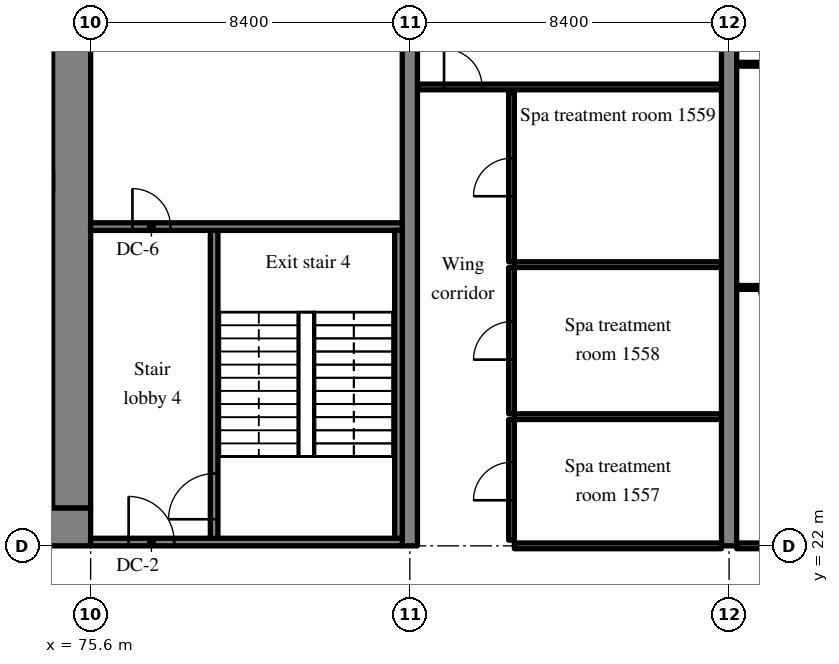
"""IFC4 building model, lengths in metres.
Left out: names, types, materials, properties, quantities, classifications, styles, units other than length and angle.
Written with IfcOpenShell. Run it as: python <this file> out.ifc"""

import sys

from ifc_helpers import new_model, si_unit, direction, frame, frame_2d, origin, place, context, subcontext, project, spatial, rectangle, extrude, source, transform, mapped, element, fill, save


model = new_model("IFC4")
c1 = context("Model", 3, precision=1e-05, world=origin(), true_north=direction((0.0, 1.0)))
c2 = subcontext(c1, "Body", "Model", "MODEL_VIEW")
j1 = project(units=[si_unit("LENGTHUNIT", "METRE"), si_unit("PLANEANGLEUNIT", "RADIAN")], contexts=[c1])
p1 = place(None, origin())
s1 = spatial("IfcSite", under=j1, at=p1, CompositionType="ELEMENT")
p2 = place(p1, origin())
s2 = spatial("IfcBuilding", under=s1, at=p2, CompositionType="ELEMENT")
p3 = place(p2, frame((0.0, 0.0, 65.8)))
s3 = spatial("IfcBuildingStorey", under=s2, at=p3, CompositionType="ELEMENT", Elevation=65.8)
m1 = source(origin(), c2, "Body", "SweptSolid", [
    extrude(rectangle(XDim=50.4, YDim=1.0, at=frame_2d((25.2, 0.0))), origin(), (0.0, 0.0, 1.0), 3.52),
])
p4 = place(p3, frame((25.2, 22.5, 0.0), z_axis=(0.0, 0.0, 1.0), x_axis=(1.0, 0.0, 0.0)))
e1 = element("IfcWall", 1, at=p4, inside=s3, PredefinedType="SHEAR", context=c2, shape_type="MappedRepresentation", body=[
    mapped(m1, transform((0.0, 0.0, 0.0), scale=1.0)),
])
m2 = source(origin(), c2, "Body", "SweptSolid", [
    extrude(rectangle(XDim=1.8, YDim=2.1, at=frame_2d((0.9, 1.05))), frame((0.0, 0.51, 0.0), z_axis=(0.0, -1.0, 0.0), x_axis=(1.0, 0.0, 0.0)), (0.0, 0.0, 1.0), 1.02),
])
p5 = place(p4, frame((15.9, 0.0, 0.0)))
e2 = element("IfcOpeningElement", 2, at=p5, cuts=e1, PredefinedType="OPENING", context=c2, shape_type="MappedRepresentation", body=[
    mapped(m2, transform((0.0, 0.0, 0.0), scale=1.0)),
])
m3 = source(origin(), c2, "Body", "SweptSolid", [
    extrude(rectangle(XDim=1.2, YDim=2.1, at=frame_2d((0.6, 1.05))), frame((0.0, 0.51, 0.0), z_axis=(0.0, -1.0, 0.0), x_axis=(1.0, 0.0, 0.0)), (0.0, 0.0, 1.0), 1.02),
])
p6 = place(p4, frame((26.987, 0.0, 0.0)))
e3 = element("IfcOpeningElement", 3, at=p6, cuts=e1, PredefinedType="OPENING", context=c2, shape_type="MappedRepresentation", body=[
    mapped(m3, transform((0.0, 0.0, 0.0), scale=1.0)),
])
m4 = source(origin(), c2, "Body", "SweptSolid", [
    extrude(rectangle(XDim=0.9, YDim=2.1, at=frame_2d((0.45, 1.05))), frame((0.0, 0.51, 0.0), z_axis=(0.0, -1.0, 0.0), x_axis=(1.0, 0.0, 0.0)), (0.0, 0.0, 1.0), 1.02),
])
p7 = place(p4, frame((34.5, 0.0, 0.0)))
e4 = element("IfcOpeningElement", 4, at=p7, cuts=e1, PredefinedType="OPENING", context=c2, shape_type="MappedRepresentation", body=[
    mapped(m4, transform((0.0, 0.0, 0.0), scale=1.0)),
])
p8 = place(p4, frame((31.5, 0.0, 0.0)))
e5 = element("IfcOpeningElement", 5, at=p8, cuts=e1, PredefinedType="OPENING", context=c2, shape_type="MappedRepresentation", body=[
    mapped(m4, transform((0.0, 0.0, 0.0), scale=1.0)),
])
p9 = place(p4, frame((39.769, 0.0, 0.0)))
e6 = element("IfcOpeningElement", 6, at=p9, cuts=e1, PredefinedType="OPENING", context=c2, shape_type="MappedRepresentation", body=[
    mapped(m4, transform((0.0, 0.0, 0.0), scale=1.0)),
])
p10 = place(p4, frame((36.756, 0.0, 0.0)))
e7 = element("IfcOpeningElement", 7, at=p10, cuts=e1, PredefinedType="OPENING", context=c2, shape_type="MappedRepresentation", body=[
    mapped(m4, transform((0.0, 0.0, 0.0), scale=1.0)),
])
p11 = place(p4, frame((6.438, 0.0, 0.0)))
e8 = element("IfcOpeningElement", 8, at=p11, cuts=e1, PredefinedType="OPENING", context=c2, shape_type="MappedRepresentation", body=[
    mapped(m3, transform((0.0, 0.0, 0.0), scale=1.0)),
])
p12 = place(p4, frame((47.725, 0.0, 0.0)))
e9 = element("IfcOpeningElement", 9, at=p12, cuts=e1, PredefinedType="OPENING", context=c2, shape_type="MappedRepresentation", body=[
    mapped(m3, transform((0.0, 0.0, 0.0), scale=1.0)),
])
m5 = source(origin(), c2, "Body", "SweptSolid", [
    extrude(rectangle(XDim=18.0, YDim=1.0, at=frame_2d((9.0, 0.0))), origin(), (0.0, 0.0, 1.0), 3.52),
])
p13 = place(p3, frame((75.1, 23.0, 0.0), z_axis=(0.0, 0.0, 1.0), x_axis=(0.0, 1.0, 0.0)))
e10 = element("IfcWall", 10, at=p13, inside=s3, PredefinedType="SHEAR", context=c2, shape_type="MappedRepresentation", body=[
    mapped(m5, transform((0.0, 0.0, 0.0), scale=1.0)),
])
p14 = place(p13, frame((12.4, 0.0, 0.0)))
e11 = element("IfcOpeningElement", 11, at=p14, cuts=e10, PredefinedType="OPENING", context=c2, shape_type="MappedRepresentation", body=[
    mapped(m3, transform((0.0, 0.0, 0.0), scale=1.0)),
])
m6 = source(origin(), c2, "Body", "SweptSolid", [
    extrude(rectangle(XDim=20.0, YDim=0.4, at=frame_2d((10.0, 0.0))), origin(), (0.0, 0.0, 1.0), 3.52),
])
for number, where, z_axis, x_axis in (
    (12, (84.0, 22.0, 0.0), (0.0, 0.0, 1.0), (0.0, 1.0, 0.0)),
    (13, (92.4, 22.0, 0.0), (0.0, 0.0, 1.0), (0.0, 1.0, 0.0)),
):
    element("IfcWall", number, at=place(p3, frame(where, z_axis=z_axis, x_axis=x_axis)), inside=s3, PredefinedType="SHEAR", context=c2, shape_type="MappedRepresentation", body=[
        mapped(m6, transform((0.0, 0.0, 0.0), scale=1.0)),
    ])
m7 = source(origin(), c2, "Body", "SweptSolid", [
    extrude(rectangle(XDim=2.15, YDim=0.2, at=frame_2d((1.075, 0.0))), origin(), (0.0, 0.0, 1.0), 3.52),
])
p15 = place(p3, frame((72.45, 33.6, 0.0), z_axis=(0.0, 0.0, 1.0), x_axis=(1.0, 0.0, 0.0)))
e14 = element("IfcWall", 14, at=p15, inside=s3, PredefinedType="SOLIDWALL", context=c2, shape_type="MappedRepresentation", body=[
    mapped(m7, transform((0.0, 0.0, 0.0), scale=1.0)),
])
m8 = source(origin(), c2, "Body", "SweptSolid", [
    extrude(rectangle(XDim=8.3, YDim=0.2, at=frame_2d((4.15, 0.0))), origin(), (0.0, 0.0, 1.0), 3.52),
])
p16 = place(p3, frame((78.85, 22.1, 0.0), z_axis=(0.0, 0.0, 1.0), x_axis=(0.0, 1.0, 0.0)))
e15 = element("IfcWall", 15, at=p16, inside=s3, PredefinedType="SOLIDWALL", context=c2, shape_type="MappedRepresentation", body=[
    mapped(m8, transform((0.0, 0.0, 0.0), scale=1.0)),
])
m9 = source(origin(), c2, "Body", "SweptSolid", [
    extrude(rectangle(XDim=1.2, YDim=2.1, at=frame_2d((0.6, 1.05))), frame((0.0, 0.11, 0.0), z_axis=(0.0, -1.0, 0.0), x_axis=(1.0, 0.0, 0.0)), (0.0, 0.0, 1.0), 0.22),
])
p17 = place(p16, frame((0.6, 0.0, 0.0)))
e16 = element("IfcOpeningElement", 16, at=p17, cuts=e15, PredefinedType="OPENING", context=c2, shape_type="MappedRepresentation", body=[
    mapped(m9, transform((0.0, 0.0, 0.0), scale=1.0)),
])
m10 = source(origin(), c2, "Body", "SweptSolid", [
    extrude(rectangle(XDim=8.2, YDim=0.2, at=frame_2d((4.1, 0.0))), origin(), (0.0, 0.0, 1.0), 3.52),
])
p18 = place(p3, frame((83.8, 22.1, 0.0), z_axis=(0.0, 0.0, 1.0), x_axis=(-1.0, 0.0, 0.0)))
e17 = element("IfcWall", 17, at=p18, inside=s3, PredefinedType="SOLIDWALL", context=c2, shape_type="MappedRepresentation", body=[
    mapped(m10, transform((0.0, 0.0, 0.0), scale=1.0)),
])
p19 = place(p18, frame((6.0, 0.0, 0.0)))
e18 = element("IfcOpeningElement", 18, at=p19, cuts=e17, PredefinedType="OPENING", context=c2, shape_type="MappedRepresentation", body=[
    mapped(m9, transform((0.0, 0.0, 0.0), scale=1.0)),
])
p20 = place(p3, frame((83.8, 30.4, 0.0), z_axis=(0.0, 0.0, 1.0), x_axis=(-1.0, 0.0, 0.0)))
e19 = element("IfcWall", 19, at=p20, inside=s3, PredefinedType="SOLIDWALL", context=c2, shape_type="MappedRepresentation", body=[
    mapped(m10, transform((0.0, 0.0, 0.0), scale=1.0)),
])
m11 = source(origin(), c2, "Body", "SweptSolid", [
    extrude(rectangle(XDim=1.0, YDim=2.1, at=frame_2d((0.5, 1.05))), frame((0.0, 0.11, 0.0), z_axis=(0.0, -1.0, 0.0), x_axis=(1.0, 0.0, 0.0)), (0.0, 0.0, 1.0), 0.22),
])
p21 = place(p20, frame((6.1, 0.0, 0.0)))
e20 = element("IfcOpeningElement", 20, at=p21, cuts=e19, PredefinedType="OPENING", context=c2, shape_type="MappedRepresentation", body=[
    mapped(m11, transform((0.0, 0.0, 0.0), scale=1.0)),
])
m12 = source(origin(), c2, "Body", "SweptSolid", [
    extrude(rectangle(XDim=8.1, YDim=0.2, at=frame_2d((4.05, 0.0))), origin(), (0.0, 0.0, 1.0), 3.52),
])
p22 = place(p3, frame((83.7, 22.2, 0.0), z_axis=(0.0, 0.0, 1.0), x_axis=(0.0, 1.0, 0.0)))
e21 = element("IfcWall", 21, at=p22, inside=s3, PredefinedType="SOLIDWALL", context=c2, shape_type="MappedRepresentation", body=[
    mapped(m12, transform((0.0, 0.0, 0.0), scale=1.0)),
])
m13 = source(origin(), c2, "Body", "SweptSolid", [
    extrude(rectangle(XDim=5.45, YDim=0.15, at=frame_2d((2.725, 0.0))), origin(), (0.0, 0.0, 1.0), 2.82),
])
p23 = place(p3, frame((86.75, 22.0, 0.0), z_axis=(0.0, 0.0, 1.0), x_axis=(1.0, 0.0, 0.0)))
e22 = element("IfcWall", 22, at=p23, inside=s3, PredefinedType="PARTITIONING", context=c2, shape_type="MappedRepresentation", body=[
    mapped(m13, transform((0.0, 0.0, 0.0), scale=1.0)),
])
m14 = source(origin(), c2, "Body", "SweptSolid", [
    extrude(rectangle(XDim=3.175, YDim=0.15, at=frame_2d((1.587, 0.0))), origin(), (0.0, 0.0, 1.0), 3.52),
])
p24 = place(p3, frame((86.675, 22.15, 0.0), z_axis=(0.0, 0.0, 1.0), x_axis=(0.0, 1.0, 0.0)))
e23 = element("IfcWall", 23, at=p24, inside=s3, PredefinedType="PARTITIONING", context=c2, shape_type="MappedRepresentation", body=[
    mapped(m14, transform((0.0, 0.0, 0.0), scale=1.0)),
])
m15 = source(origin(), c2, "Body", "SweptSolid", [
    extrude(rectangle(XDim=1.0, YDim=2.1, at=frame_2d((0.5, 1.05))), frame((0.0, 0.085, 0.0), z_axis=(0.0, -1.0, 0.0), x_axis=(1.0, 0.0, 0.0)), (0.0, 0.0, 1.0), 0.17),
])
p25 = place(p24, frame((1.05, 0.0, 0.0)))
e24 = element("IfcOpeningElement", 24, at=p25, cuts=e23, PredefinedType="OPENING", context=c2, shape_type="MappedRepresentation", body=[
    mapped(m15, transform((0.0, 0.0, 0.0), scale=1.0)),
])
m16 = source(origin(), c2, "Body", "SweptSolid", [
    extrude(rectangle(XDim=5.45, YDim=0.15, at=frame_2d((2.725, 0.0))), origin(), (0.0, 0.0, 1.0), 3.52),
])
p26 = place(p3, frame((86.75, 25.4, 0.0), z_axis=(0.0, 0.0, 1.0), x_axis=(1.0, 0.0, 0.0)))
e25 = element("IfcWall", 25, at=p26, inside=s3, PredefinedType="PARTITIONING", context=c2, shape_type="MappedRepresentation", body=[
    mapped(m16, transform((0.0, 0.0, 0.0), scale=1.0)),
])
m17 = source(origin(), c2, "Body", "SweptSolid", [
    extrude(rectangle(XDim=3.85, YDim=0.15, at=frame_2d((1.925, 0.0))), origin(), (0.0, 0.0, 1.0), 3.52),
])
p27 = place(p3, frame((86.675, 25.475, 0.0), z_axis=(0.0, 0.0, 1.0), x_axis=(0.0, 1.0, 0.0)))
e26 = element("IfcWall", 26, at=p27, inside=s3, PredefinedType="PARTITIONING", context=c2, shape_type="MappedRepresentation", body=[
    mapped(m17, transform((0.0, 0.0, 0.0), scale=1.0)),
])
p28 = place(p27, frame((1.425, 0.0, 0.0)))
e27 = element("IfcOpeningElement", 27, at=p28, cuts=e26, PredefinedType="OPENING", context=c2, shape_type="MappedRepresentation", body=[
    mapped(m15, transform((0.0, 0.0, 0.0), scale=1.0)),
])
p29 = place(p3, frame((86.75, 29.4, 0.0), z_axis=(0.0, 0.0, 1.0), x_axis=(1.0, 0.0, 0.0)))
e28 = element("IfcWall", 28, at=p29, inside=s3, PredefinedType="PARTITIONING", context=c2, shape_type="MappedRepresentation", body=[
    mapped(m16, transform((0.0, 0.0, 0.0), scale=1.0)),
])
m18 = source(origin(), c2, "Body", "SweptSolid", [
    extrude(rectangle(XDim=4.45, YDim=0.15, at=frame_2d((2.225, 0.0))), origin(), (0.0, 0.0, 1.0), 3.52),
])
p30 = place(p3, frame((86.675, 29.475, 0.0), z_axis=(0.0, 0.0, 1.0), x_axis=(0.0, 1.0, 0.0)))
e29 = element("IfcWall", 29, at=p30, inside=s3, PredefinedType="PARTITIONING", context=c2, shape_type="MappedRepresentation", body=[
    mapped(m18, transform((0.0, 0.0, 0.0), scale=1.0)),
])
p31 = place(p30, frame((1.725, 0.0, 0.0)))
e30 = element("IfcOpeningElement", 30, at=p31, cuts=e29, PredefinedType="OPENING", context=c2, shape_type="MappedRepresentation", body=[
    mapped(m15, transform((0.0, 0.0, 0.0), scale=1.0)),
])
m19 = source(origin(), c2, "Body", "SweptSolid", [
    extrude(rectangle(XDim=8.0, YDim=0.15, at=frame_2d((4.0, 0.0))), origin(), (0.0, 0.0, 1.0), 3.52),
])
p32 = place(p3, frame((84.2, 34.075, 0.0), z_axis=(0.0, 0.0, 1.0), x_axis=(1.0, 0.0, 0.0)))
e31 = element("IfcWall", 31, at=p32, inside=s3, PredefinedType="PARTITIONING", context=c2, shape_type="MappedRepresentation", body=[
    mapped(m19, transform((0.0, 0.0, 0.0), scale=1.0)),
])
p33 = place(p32, frame((0.7, 0.0, 0.0)))
e32 = element("IfcOpeningElement", 32, at=p33, cuts=e31, PredefinedType="OPENING", context=c2, shape_type="MappedRepresentation", body=[
    mapped(m15, transform((0.0, 0.0, 0.0), scale=1.0)),
])
m20 = source(origin(), c2, "Body", "SweptSolid", [
    extrude(rectangle(XDim=2.05, YDim=0.1, at=frame_2d((1.025, 0.0))), origin(), (0.0, 0.0, 1.0), 3.52),
])
p34 = place(p3, frame((92.6, 28.8, 0.0), z_axis=(0.0, 0.0, 1.0), x_axis=(1.0, 0.0, 0.0)))
e33 = element("IfcWall", 33, at=p34, inside=s3, PredefinedType="PARTITIONING", context=c2, shape_type="MappedRepresentation", body=[
    mapped(m20, transform((0.0, 0.0, 0.0), scale=1.0)),
])
m21 = source(origin(), c2, "Body", "SweptSolid", [
    extrude(rectangle(XDim=0.9, YDim=2.1, at=frame_2d((0.45, 1.05))), frame((0.0, 0.06, 0.0), z_axis=(0.0, -1.0, 0.0), x_axis=(1.0, 0.0, 0.0)), (0.0, 0.0, 1.0), 0.12),
])
p35 = place(p34, frame((0.575, 0.0, 0.0)))
e34 = element("IfcOpeningElement", 34, at=p35, cuts=e33, PredefinedType="OPENING", context=c2, shape_type="MappedRepresentation", body=[
    mapped(m21, transform((0.0, 0.0, 0.0), scale=1.0)),
])
m22 = source(origin(), c2, "Body", "SweptSolid", [
    extrude(rectangle(XDim=7.8, YDim=0.1, at=frame_2d((3.9, 0.0))), origin(), (0.0, 0.0, 1.0), 3.52),
])
p36 = place(p3, frame((92.6, 34.672, 0.0), z_axis=(0.0, 0.0, 1.0), x_axis=(1.0, 0.0, 0.0)))
e35 = element("IfcWall", 35, at=p36, inside=s3, PredefinedType="PARTITIONING", context=c2, shape_type="MappedRepresentation", body=[
    mapped(m22, transform((0.0, 0.0, 0.0), scale=1.0)),
])
m23 = source(origin(), c2, "Body", "SweptSolid", [
    extrude(rectangle(XDim=1.8, YDim=2.1, at=frame_2d((0.9, 1.05))), frame((0.0, 0.06, 0.0), z_axis=(0.0, -1.0, 0.0), x_axis=(1.0, 0.0, 0.0)), (0.0, 0.0, 1.0), 0.12),
])
p37 = place(p36, frame((3.0, 0.0, 0.0)))
e36 = element("IfcOpeningElement", 36, at=p37, cuts=e35, PredefinedType="OPENING", context=c2, shape_type="MappedRepresentation", body=[
    mapped(m23, transform((0.0, 0.0, 0.0), scale=1.0)),
])
m24 = source(origin(), c2, "Body", "SweptSolid", [
    extrude(rectangle(XDim=7.8, YDim=0.15, at=frame_2d((3.9, 0.0))), origin(), (0.0, 0.0, 1.0), 2.82),
])
p38 = place(p3, frame((92.6, 22.0, 0.0), z_axis=(0.0, 0.0, 1.0), x_axis=(1.0, 0.0, 0.0)))
e37 = element("IfcWall", 37, at=p38, inside=s3, PredefinedType="PARTITIONING", context=c2, shape_type="MappedRepresentation", body=[
    mapped(m24, transform((0.0, 0.0, 0.0), scale=1.0)),
])
p39 = place(p38, frame((6.25, 0.0, 0.0)))
e38 = element("IfcOpeningElement", 38, at=p39, cuts=e37, PredefinedType="OPENING", context=c2, shape_type="MappedRepresentation", body=[
    mapped(m15, transform((0.0, 0.0, 0.0), scale=1.0)),
])
m25 = source(origin(), c2, "Body", "SweptSolid", [
    extrude(rectangle(XDim=1.2, YDim=2.1, at=frame_2d((0.6, 1.05))), frame((0.0, 0.025, 0.0), z_axis=(0.0, -1.0, 0.0), x_axis=(1.0, 0.0, 0.0)), (0.0, 0.0, 1.0), 0.05),
])
p40 = place(p17, origin())
e39 = element("IfcDoor", 39, at=p40, inside=s3, OperationType="SINGLE_SWING_LEFT", PredefinedType="DOOR", context=c2, shape_type="MappedRepresentation", body=[
    mapped(m25, transform((0.0, 0.0, 0.0), scale=1.0)),
])
fill(e16, e39)
p41 = place(p19, origin())
e40 = element("IfcDoor", 40, at=p41, inside=s3, OperationType="SINGLE_SWING_RIGHT", PredefinedType="DOOR", context=c2, shape_type="MappedRepresentation", body=[
    mapped(m25, transform((0.0, 0.0, 0.0), scale=1.0)),
])
fill(e18, e40)
m26 = source(origin(), c2, "Body", "SweptSolid", [
    extrude(rectangle(XDim=1.0, YDim=2.1, at=frame_2d((0.5, 1.05))), frame((0.0, 0.025, 0.0), z_axis=(0.0, -1.0, 0.0), x_axis=(1.0, 0.0, 0.0)), (0.0, 0.0, 1.0), 0.05),
])
p42 = place(p21, origin())
e41 = element("IfcDoor", 41, at=p42, inside=s3, OperationType="SINGLE_SWING_RIGHT", PredefinedType="DOOR", context=c2, shape_type="MappedRepresentation", body=[
    mapped(m26, transform((0.0, 0.0, 0.0), scale=1.0)),
])
fill(e20, e41)
p43 = place(p25, origin())
e42 = element("IfcDoor", 42, at=p43, inside=s3, OperationType="SINGLE_SWING_LEFT", PredefinedType="DOOR", context=c2, shape_type="MappedRepresentation", body=[
    mapped(m26, transform((0.0, 0.0, 0.0), scale=1.0)),
])
fill(e24, e42)
p44 = place(p28, origin())
e43 = element("IfcDoor", 43, at=p44, inside=s3, OperationType="SINGLE_SWING_LEFT", PredefinedType="DOOR", context=c2, shape_type="MappedRepresentation", body=[
    mapped(m26, transform((0.0, 0.0, 0.0), scale=1.0)),
])
fill(e27, e43)
p45 = place(p31, origin())
e44 = element("IfcDoor", 44, at=p45, inside=s3, OperationType="SINGLE_SWING_LEFT", PredefinedType="DOOR", context=c2, shape_type="MappedRepresentation", body=[
    mapped(m26, transform((0.0, 0.0, 0.0), scale=1.0)),
])
fill(e30, e44)
p46 = place(p33, origin())
e45 = element("IfcDoor", 45, at=p46, inside=s3, OperationType="SINGLE_SWING_LEFT", PredefinedType="DOOR", context=c2, shape_type="MappedRepresentation", body=[
    mapped(m26, transform((0.0, 0.0, 0.0), scale=1.0)),
])
fill(e32, e45)
m27 = source(origin(), c2, "Body", "SweptSolid", [
    extrude(rectangle(XDim=0.9, YDim=2.1, at=frame_2d((0.45, 1.05))), frame((0.0, 0.025, 0.0), z_axis=(0.0, -1.0, 0.0), x_axis=(1.0, 0.0, 0.0)), (0.0, 0.0, 1.0), 0.05),
])
p47 = place(p35, origin())
e46 = element("IfcDoor", 46, at=p47, inside=s3, OperationType="SINGLE_SWING_RIGHT", PredefinedType="DOOR", context=c2, shape_type="MappedRepresentation", body=[
    mapped(m27, transform((0.0, 0.0, 0.0), scale=1.0)),
])
fill(e34, e46)
save(model, sys.argv[1])
